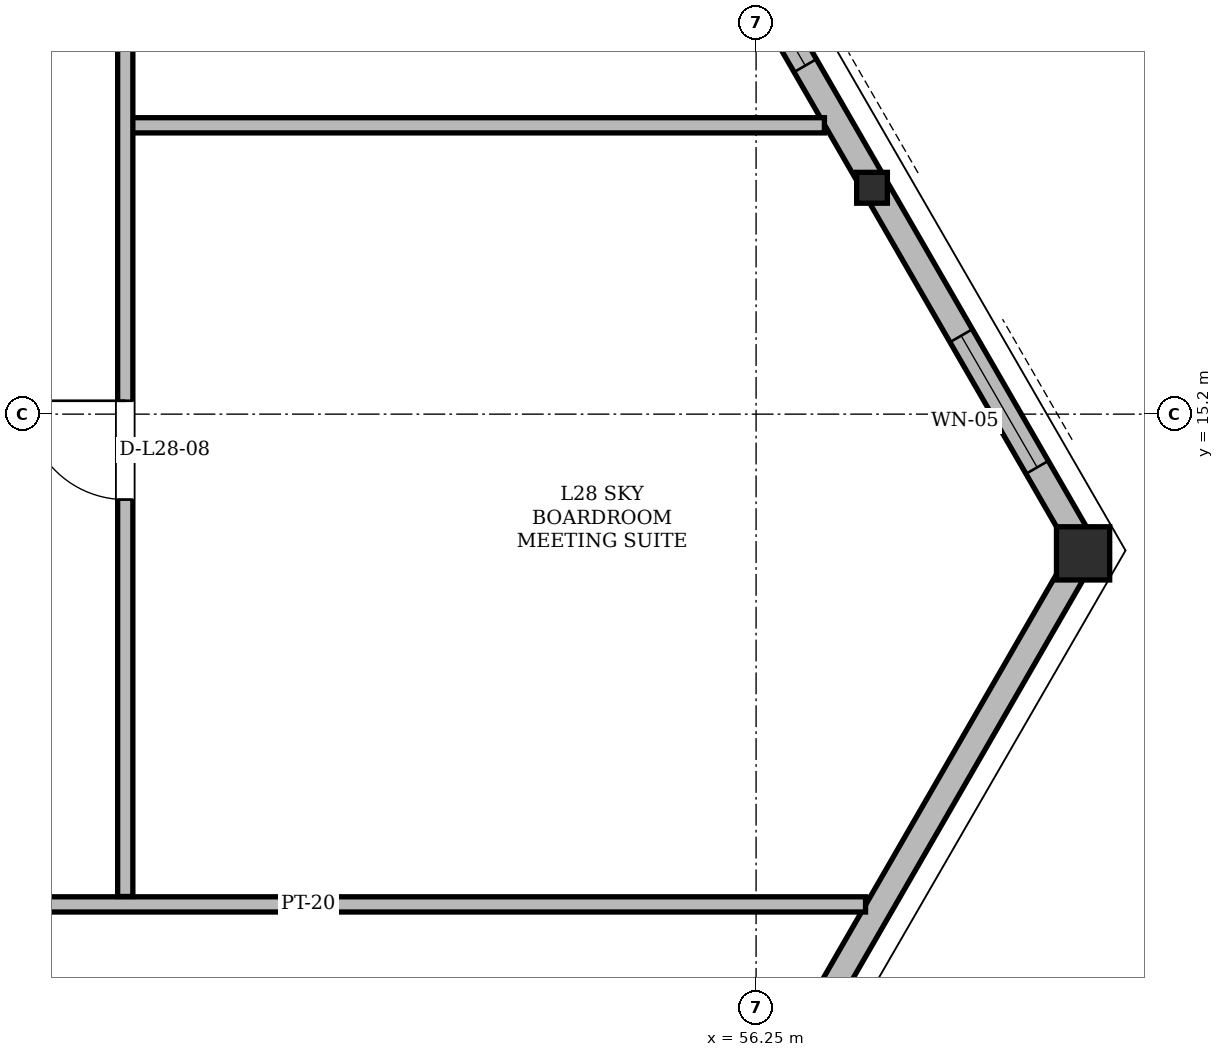
"""IFC4 building model, lengths in metres.
Left out: names, types, materials, properties, quantities, classifications, styles, units other than length and angle.
Written with IfcOpenShell. Run it as: python <this file> out.ifc"""

import sys

from ifc_helpers import new_model, si_unit, direction, frame, frame_2d, origin, origin_2d, place, context, subcontext, project, spatial, rectangle, hollow_rectangle, i_section, extrude, element, fill, save


model = new_model("IFC4")
c1 = context("Model", 3, precision=1e-05, world=origin(), true_north=direction((0.0, 1.0)))
c2 = subcontext(c1, "Body", "Model", "MODEL_VIEW")
j1 = project(units=[si_unit("LENGTHUNIT", "METRE"), si_unit("PLANEANGLEUNIT", "RADIAN")], contexts=[c1])
p1 = place(None, origin())
s1 = spatial("IfcSite", under=j1, at=p1, CompositionType="ELEMENT")
p2 = place(p1, origin())
s2 = spatial("IfcBuilding", under=s1, at=p2, CompositionType="ELEMENT")
p3 = place(p2, frame((0.0, 0.0, 107.7)))
s3 = spatial("IfcBuildingStorey", under=s2, at=p3, CompositionType="ELEMENT", Elevation=107.7)
p4 = place(p3, frame((60.58, 13.406, 0.005), z_axis=(-0.012174579722, -0.016903099525, 0.999783008875), x_axis=(0.811435353825, -0.584442184106, 0.0)))
e1 = element("IfcColumn", 1, at=p4, inside=s3, PredefinedType="COLUMN", context=c2, shape_type="SweptSolid", body=[
    extrude(hollow_rectangle(XDim=0.7, YDim=0.7, WallThickness=0.055, at=origin_2d()), origin(), (0.0, 0.0, 1.0), 4.492),
])
p5 = place(p3, frame((57.806, 18.211, 0.005), z_axis=(-0.013533621776, -0.014511955881, 0.999803102725), x_axis=(0.731328464802, -0.682025422231, 0.0)))
e2 = element("IfcColumn", 2, at=p5, inside=s3, PredefinedType="COLUMN", context=c2, shape_type="SweptSolid", body=[
    extrude(i_section(OverallWidth=0.404, OverallDepth=0.406, WebThickness=0.027, FlangeThickness=0.044, at=origin_2d()), origin(), (0.0, 0.0, 1.0), 4.492),
])
p6 = place(p3, frame((54.837, 3.459, 0.0), z_axis=(0.0, 0.0, 1.0), x_axis=(0.500009490851, 0.86601992417, 0.0)))
e3 = element("IfcWall", 3, at=p6, inside=s3, PredefinedType="SOLIDWALL", context=c2, shape_type="SweptSolid", body=[
    extrude(rectangle(XDim=11.486, YDim=0.34, at=frame_2d((5.743, 0.0))), origin(), (0.0, 0.0, 1.0), 3.478),
])
p7 = place(p3, frame((60.58, 13.406, 0.0), z_axis=(0.0, 0.0, 1.0), x_axis=(-0.499995774941, 0.86602784311, 0.0)))
e4 = element("IfcWall", 4, at=p7, inside=s3, PredefinedType="SOLIDWALL", context=c2, shape_type="SweptSolid", body=[
    extrude(rectangle(XDim=15.387, YDim=0.34, at=frame_2d((7.693, 0.0))), origin(), (0.0, 0.0, 1.0), 3.478),
])
p8 = place(p7, frame((1.263, 0.0, 0.85)))
e5 = element("IfcOpeningElement", 5, at=p8, cuts=e4, PredefinedType="OPENING", context=c2, shape_type="SweptSolid", body=[
    extrude(rectangle(XDim=2.0, YDim=1.8, at=frame_2d((1.0, 0.9))), frame((0.0, 0.17, 0.0), z_axis=(0.0, -1.0, 0.0), x_axis=(1.0, 0.0, 0.0)), (0.0, 0.0, 1.0), 0.34),
])
p9 = place(p7, frame((7.365, 0.0, 0.85)))
e6 = element("IfcOpeningElement", 6, at=p9, cuts=e4, PredefinedType="OPENING", context=c2, shape_type="SweptSolid", body=[
    extrude(rectangle(XDim=1.8, YDim=1.75, at=frame_2d((0.9, 0.875))), frame((0.0, 0.17, 0.0), z_axis=(0.0, -1.0, 0.0), x_axis=(1.0, 0.0, 0.0)), (0.0, 0.0, 1.0), 0.34),
])
p10 = place(p7, frame((12.008, 0.0, 0.85)))
e7 = element("IfcOpeningElement", 7, at=p10, cuts=e4, PredefinedType="OPENING", context=c2, shape_type="SweptSolid", body=[
    extrude(rectangle(XDim=1.2, YDim=1.48, at=frame_2d((0.6, 0.74))), frame((0.0, 0.17, 0.0), z_axis=(0.0, -1.0, 0.0), x_axis=(1.0, 0.0, 0.0)), (0.0, 0.0, 1.0), 0.34),
])
p11 = place(p3, frame((17.31, 8.75, 0.0), z_axis=(0.0, 0.0, 1.0), x_axis=(1.0, 0.0, 0.0)))
e8 = element("IfcWall", 8, at=p11, inside=s3, PredefinedType="PARTITIONING", context=c2, shape_type="SweptSolid", body=[
    extrude(rectangle(XDim=40.38, YDim=0.2, at=frame_2d((20.19, 0.0))), origin(), (0.0, 0.0, 1.0), 3.714),
])
p12 = place(p11, frame((12.518, 0.0, 0.0)))
e9 = element("IfcOpeningElement", 9, at=p12, cuts=e8, PredefinedType="OPENING", context=c2, shape_type="SweptSolid", body=[
    extrude(rectangle(XDim=1.3, YDim=2.2, at=frame_2d((0.65, 1.1))), frame((0.0, 0.1, 0.0), z_axis=(0.0, -1.0, 0.0), x_axis=(1.0, 0.0, 0.0)), (0.0, 0.0, 1.0), 0.2),
])
p13 = place(p11, frame((22.914, 0.0, 0.0)))
e10 = element("IfcOpeningElement", 10, at=p13, cuts=e8, PredefinedType="OPENING", context=c2, shape_type="SweptSolid", body=[
    extrude(rectangle(XDim=1.3, YDim=2.2, at=frame_2d((0.65, 1.1))), frame((0.0, 0.1, 0.0), z_axis=(0.0, -1.0, 0.0), x_axis=(1.0, 0.0, 0.0)), (0.0, 0.0, 1.0), 0.2),
])
p14 = place(p3, frame((47.95, 19.0, 0.0), z_axis=(0.0, 0.0, 1.0), x_axis=(1.0, 0.0, 0.0)))
e11 = element("IfcWall", 11, at=p14, inside=s3, PredefinedType="PARTITIONING", context=c2, shape_type="SweptSolid", body=[
    extrude(rectangle(XDim=9.199, YDim=0.2, at=frame_2d((4.6, 0.0))), origin(), (0.0, 0.0, 1.0), 4.26),
])
p15 = place(p3, frame((47.95, 8.854, 0.0), z_axis=(0.0, 0.0, 1.0), x_axis=(0.0, 1.0, 0.0)))
e12 = element("IfcWall", 12, at=p15, inside=s3, PredefinedType="PARTITIONING", context=c2, shape_type="SweptSolid", body=[
    extrude(rectangle(XDim=21.242, YDim=0.2, at=frame_2d((10.621, 0.0))), origin(), (0.0, 0.0, 1.0), 3.714),
])
p16 = place(p15, frame((5.222, 0.0, 0.0)))
e13 = element("IfcOpeningElement", 13, at=p16, cuts=e12, PredefinedType="OPENING", context=c2, shape_type="SweptSolid", body=[
    extrude(rectangle(XDim=1.3, YDim=2.2, at=frame_2d((0.65, 1.1))), frame((0.0, 0.1, 0.0), z_axis=(0.0, -1.0, 0.0), x_axis=(1.0, 0.0, 0.0)), (0.0, 0.0, 1.0), 0.2),
])
p17 = place(p15, frame((12.272, 0.0, 0.0)))
e14 = element("IfcOpeningElement", 14, at=p17, cuts=e12, PredefinedType="OPENING", context=c2, shape_type="SweptSolid", body=[
    extrude(rectangle(XDim=1.3, YDim=2.2, at=frame_2d((0.65, 1.1))), frame((0.0, 0.1, 0.0), z_axis=(0.0, -1.0, 0.0), x_axis=(1.0, 0.0, 0.0)), (0.0, 0.0, 1.0), 0.2),
])
p18 = place(p8, origin())
e15 = element("IfcWindow", 15, at=p18, inside=s3, PartitioningType="SINGLE_PANEL", PredefinedType="WINDOW", context=c2, shape_type="SweptSolid", body=[
    extrude(rectangle(XDim=2.0, YDim=1.8, at=frame_2d((1.0, 0.9))), frame((0.0, 0.03, 0.0), z_axis=(0.0, -1.0, 0.0), x_axis=(1.0, 0.0, 0.0)), (0.0, 0.0, 1.0), 0.06),
])
fill(e5, e15)
p19 = place(p9, origin())
e16 = element("IfcWindow", 16, at=p19, inside=s3, PartitioningType="SINGLE_PANEL", PredefinedType="WINDOW", context=c2, shape_type="SweptSolid", body=[
    extrude(rectangle(XDim=1.8, YDim=1.75, at=frame_2d((0.9, 0.875))), frame((0.0, 0.03, 0.0), z_axis=(0.0, -1.0, 0.0), x_axis=(1.0, 0.0, 0.0)), (0.0, 0.0, 1.0), 0.06),
])
fill(e6, e16)
p20 = place(p16, origin())
e17 = element("IfcDoor", 17, at=p20, inside=s3, OperationType="SINGLE_SWING_RIGHT", PredefinedType="DOOR", context=c2, shape_type="SweptSolid", body=[
    extrude(rectangle(XDim=1.3, YDim=2.2, at=frame_2d((0.65, 1.1))), frame((0.0, 0.025, 0.0), z_axis=(0.0, -1.0, 0.0), x_axis=(1.0, 0.0, 0.0)), (0.0, 0.0, 1.0), 0.05),
])
fill(e13, e17)
save(model, sys.argv[1])
